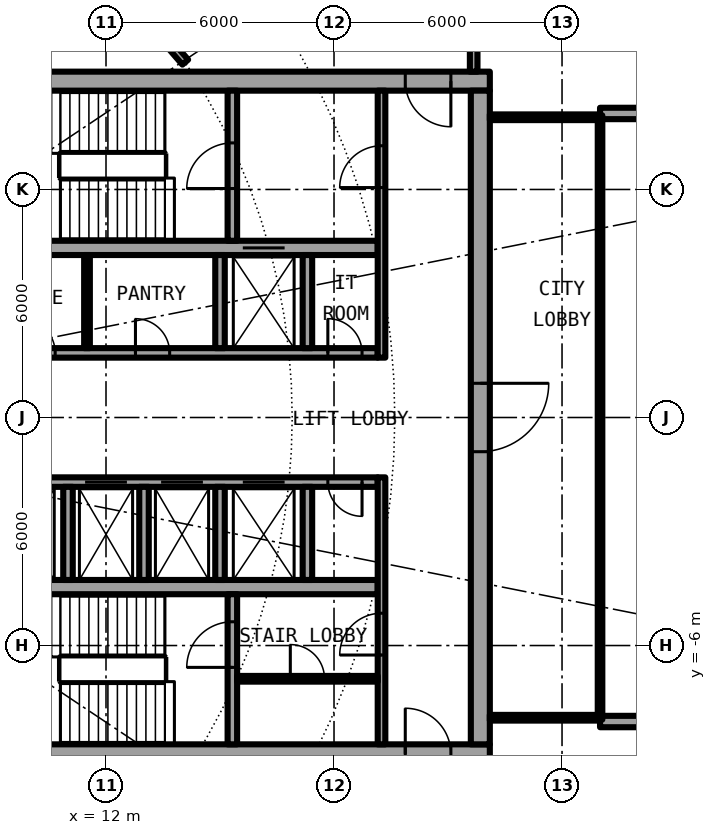
"""IFC4 building model, lengths in metres.
Left out: names, types, materials, properties, quantities, classifications, styles, units other than length and angle.
Written with IfcOpenShell. Run it as: python <this file> out.ifc"""

import sys

from ifc_helpers import new_model, si_unit, direction, frame, frame_2d, origin, place, context, subcontext, project, spatial, rectangle, extrude, element, fill, save


model = new_model("IFC4")
c1 = context("Model", 3, precision=1e-05, world=origin(), true_north=direction((0.0, 1.0)))
c2 = subcontext(c1, "Body", "Model", "MODEL_VIEW")
j1 = project(units=[si_unit("LENGTHUNIT", "METRE"), si_unit("PLANEANGLEUNIT", "RADIAN")], contexts=[c1])
p1 = place(None, origin())
s1 = spatial("IfcSite", under=j1, at=p1, CompositionType="ELEMENT")
p2 = place(p1, origin())
s2 = spatial("IfcBuilding", under=s1, at=p2, CompositionType="ELEMENT")
p3 = place(p2, frame((0.0, 0.0, 157.4)))
s3 = spatial("IfcBuildingStorey", under=s2, at=p3, CompositionType="ELEMENT", Elevation=157.4)
for number, where, z_axis, x_axis in (
    (1, (25.0, 8.0, 0.0), (0.0, 0.0, 1.0), (1.0, 0.0, 0.0)),
    (2, (25.0, -8.0, 0.0), (0.0, 0.0, 1.0), (1.0, 0.0, 0.0)),
):
    element("IfcWall", number, at=place(p3, frame(where, z_axis=z_axis, x_axis=x_axis)), inside=s3, PredefinedType="SOLIDWALL", context=c2, shape_type="SweptSolid", body=[
        extrude(rectangle(XDim=2.667, YDim=0.3, at=frame_2d((1.333, 0.0))), origin(), (0.0, 0.0, 1.0), 3.85),
    ])
p4 = place(p3, frame((22.1, 8.85, 0.0), z_axis=(0.0, 0.0, 1.0), x_axis=(-1.0, 0.0, 0.0)))
e3 = element("IfcWall", 3, at=p4, inside=s3, PredefinedType="SHEAR", context=c2, shape_type="SweptSolid", body=[
    extrude(rectangle(XDim=13.6, YDim=0.5, at=frame_2d((6.8, 0.0))), origin(), (0.0, 0.0, 1.0), 4.2),
])
p5 = place(p4, frame((1.025, 0.0, 0.0)))
e4 = element("IfcOpeningElement", 4, at=p5, cuts=e3, PredefinedType="OPENING", context=c2, shape_type="SweptSolid", body=[
    extrude(rectangle(XDim=1.2, YDim=2.3, at=frame_2d((0.6, 1.15))), frame((0.0, 0.26, 0.0), z_axis=(0.0, -1.0, 0.0), x_axis=(1.0, 0.0, 0.0)), (0.0, 0.0, 1.0), 0.52),
])
p6 = place(p3, frame((8.5, -8.85, 0.0), z_axis=(0.0, 0.0, 1.0), x_axis=(1.0, 0.0, 0.0)))
e5 = element("IfcWall", 5, at=p6, inside=s3, PredefinedType="SHEAR", context=c2, shape_type="SweptSolid", body=[
    extrude(rectangle(XDim=13.6, YDim=0.5, at=frame_2d((6.8, 0.0))), origin(), (0.0, 0.0, 1.0), 4.2),
])
p7 = place(p6, frame((11.375, 0.0, 0.0)))
e6 = element("IfcOpeningElement", 6, at=p7, cuts=e5, PredefinedType="OPENING", context=c2, shape_type="SweptSolid", body=[
    extrude(rectangle(XDim=1.2, YDim=2.3, at=frame_2d((0.6, 1.15))), frame((0.0, 0.26, 0.0), z_axis=(0.0, -1.0, 0.0), x_axis=(1.0, 0.0, 0.0)), (0.0, 0.0, 1.0), 0.52),
])
p8 = place(p3, frame((21.85, 8.6, 0.0), z_axis=(0.0, 0.0, 1.0), x_axis=(0.0, -1.0, 0.0)))
e7 = element("IfcWall", 7, at=p8, inside=s3, PredefinedType="SHEAR", context=c2, shape_type="SweptSolid", body=[
    extrude(rectangle(XDim=17.2, YDim=0.5, at=frame_2d((8.6, 0.0))), origin(), (0.0, 0.0, 1.0), 4.2),
])
p9 = place(p8, frame((7.7, 0.0, 0.0)))
e8 = element("IfcOpeningElement", 8, at=p9, cuts=e7, PredefinedType="OPENING", context=c2, shape_type="SweptSolid", body=[
    extrude(rectangle(XDim=1.8, YDim=2.3, at=frame_2d((0.9, 1.15))), frame((0.0, 0.26, 0.0), z_axis=(0.0, -1.0, 0.0), x_axis=(1.0, 0.0, 0.0)), (0.0, 0.0, 1.0), 0.52),
])
p10 = place(p3, frame((9.0, 1.7, 0.0), z_axis=(0.0, 0.0, 1.0), x_axis=(1.0, 0.0, 0.0)))
e9 = element("IfcWall", 9, at=p10, inside=s3, PredefinedType="SHEAR", context=c2, shape_type="SweptSolid", body=[
    extrude(rectangle(XDim=10.15, YDim=0.25, at=frame_2d((5.075, 0.0))), origin(), (0.0, 0.0, 1.0), 4.2),
])
p11 = place(p10, frame((0.762, 0.0, 0.0)))
e10 = element("IfcOpeningElement", 10, at=p11, cuts=e9, PredefinedType="OPENING", context=c2, shape_type="SweptSolid", body=[
    extrude(rectangle(XDim=0.9, YDim=2.3, at=frame_2d((0.45, 1.15))), frame((0.0, 0.135, 0.0), z_axis=(0.0, -1.0, 0.0), x_axis=(1.0, 0.0, 0.0)), (0.0, 0.0, 1.0), 0.27),
])
p12 = place(p10, frame((3.775, 0.0, 0.0)))
e11 = element("IfcOpeningElement", 11, at=p12, cuts=e9, PredefinedType="OPENING", context=c2, shape_type="SweptSolid", body=[
    extrude(rectangle(XDim=0.9, YDim=2.3, at=frame_2d((0.45, 1.15))), frame((0.0, 0.135, 0.0), z_axis=(0.0, -1.0, 0.0), x_axis=(1.0, 0.0, 0.0)), (0.0, 0.0, 1.0), 0.27),
])
p13 = place(p10, frame((8.837, 0.0, 0.0)))
e12 = element("IfcOpeningElement", 12, at=p13, cuts=e9, PredefinedType="OPENING", context=c2, shape_type="SweptSolid", body=[
    extrude(rectangle(XDim=0.9, YDim=2.3, at=frame_2d((0.45, 1.15))), frame((0.0, 0.135, 0.0), z_axis=(0.0, -1.0, 0.0), x_axis=(1.0, 0.0, 0.0)), (0.0, 0.0, 1.0), 0.27),
])
p14 = place(p3, frame((9.0, 4.462, 0.0), z_axis=(0.0, 0.0, 1.0), x_axis=(1.0, 0.0, 0.0)))
e13 = element("IfcWall", 13, at=p14, inside=s3, PredefinedType="SHEAR", context=c2, shape_type="SweptSolid", body=[
    extrude(rectangle(XDim=10.15, YDim=0.375, at=frame_2d((5.075, 0.0))), origin(), (0.0, 0.0, 1.0), 4.2),
])
p15 = place(p14, frame((6.6, 0.0, 0.0)))
e14 = element("IfcOpeningElement", 14, at=p15, cuts=e13, PredefinedType="OPENING", context=c2, shape_type="SweptSolid", body=[
    extrude(rectangle(XDim=1.1, YDim=2.3, at=frame_2d((0.55, 1.15))), frame((0.0, 0.198, 0.0), z_axis=(0.0, -1.0, 0.0), x_axis=(1.0, 0.0, 0.0)), (0.0, 0.0, 1.0), 0.395),
])
p16 = place(p3, frame((15.325, 4.65, 0.0), z_axis=(0.0, 0.0, 1.0), x_axis=(0.0, 1.0, 0.0)))
e15 = element("IfcWall", 15, at=p16, inside=s3, PredefinedType="SHEAR", context=c2, shape_type="SweptSolid", body=[
    extrude(rectangle(XDim=3.95, YDim=0.25, at=frame_2d((1.975, 0.0))), origin(), (0.0, 0.0, 1.0), 4.2),
])
p17 = place(p16, frame((1.375, 0.0, 0.0)))
e16 = element("IfcOpeningElement", 16, at=p17, cuts=e15, PredefinedType="OPENING", context=c2, shape_type="SweptSolid", body=[
    extrude(rectangle(XDim=1.2, YDim=2.3, at=frame_2d((0.6, 1.15))), frame((0.0, 0.135, 0.0), z_axis=(0.0, -1.0, 0.0), x_axis=(1.0, 0.0, 0.0)), (0.0, 0.0, 1.0), 0.27),
])
for number, where, z_axis, x_axis in (
    (17, (15.0, 1.825, 0.0), (0.0, 0.0, 1.0), (0.0, 1.0, 0.0)),
    (18, (17.3, 1.825, 0.0), (0.0, 0.0, 1.0), (0.0, 1.0, 0.0)),
):
    element("IfcWall", number, at=place(p3, frame(where, z_axis=z_axis, x_axis=x_axis)), inside=s3, PredefinedType="SOLIDWALL", context=c2, shape_type="SweptSolid", body=[
        extrude(rectangle(XDim=2.45, YDim=0.25, at=frame_2d((1.225, 0.0))), origin(), (0.0, 0.0, 1.0), 3.85),
    ])
p18 = place(p3, frame((19.25, 1.575, 0.0), z_axis=(0.0, 0.0, 1.0), x_axis=(0.0, 1.0, 0.0)))
e19 = element("IfcWall", 19, at=p18, inside=s3, PredefinedType="SOLIDWALL", context=c2, shape_type="SweptSolid", body=[
    extrude(rectangle(XDim=7.025, YDim=0.2, at=frame_2d((3.513, 0.0))), origin(), (0.0, 0.0, 1.0), 3.85),
])
p19 = place(p18, frame((4.475, 0.0, 0.0)))
e20 = element("IfcOpeningElement", 20, at=p19, cuts=e19, PredefinedType="OPENING", context=c2, shape_type="SweptSolid", body=[
    extrude(rectangle(XDim=1.1, YDim=2.3, at=frame_2d((0.55, 1.15))), frame((0.0, 0.11, 0.0), z_axis=(0.0, -1.0, 0.0), x_axis=(1.0, 0.0, 0.0)), (0.0, 0.0, 1.0), 0.22),
])
p20 = place(p3, frame((19.15, -1.7, 0.0), z_axis=(0.0, 0.0, 1.0), x_axis=(-1.0, 0.0, 0.0)))
e21 = element("IfcWall", 21, at=p20, inside=s3, PredefinedType="SHEAR", context=c2, shape_type="SweptSolid", body=[
    extrude(rectangle(XDim=10.15, YDim=0.25, at=frame_2d((5.075, 0.0))), origin(), (0.0, 0.0, 1.0), 4.2),
])
p21 = place(p20, frame((8.663, 0.0, 0.0)))
e22 = element("IfcOpeningElement", 22, at=p21, cuts=e21, PredefinedType="OPENING", context=c2, shape_type="SweptSolid", body=[
    extrude(rectangle(XDim=1.1, YDim=2.3, at=frame_2d((0.55, 1.15))), frame((0.0, 0.135, 0.0), z_axis=(0.0, -1.0, 0.0), x_axis=(1.0, 0.0, 0.0)), (0.0, 0.0, 1.0), 0.27),
])
p22 = place(p20, frame((6.6, 0.0, 0.0)))
e23 = element("IfcOpeningElement", 23, at=p22, cuts=e21, PredefinedType="OPENING", context=c2, shape_type="SweptSolid", body=[
    extrude(rectangle(XDim=1.1, YDim=2.3, at=frame_2d((0.55, 1.15))), frame((0.0, 0.135, 0.0), z_axis=(0.0, -1.0, 0.0), x_axis=(1.0, 0.0, 0.0)), (0.0, 0.0, 1.0), 0.27),
])
p23 = place(p20, frame((4.6, 0.0, 0.0)))
e24 = element("IfcOpeningElement", 24, at=p23, cuts=e21, PredefinedType="OPENING", context=c2, shape_type="SweptSolid", body=[
    extrude(rectangle(XDim=1.1, YDim=2.3, at=frame_2d((0.55, 1.15))), frame((0.0, 0.135, 0.0), z_axis=(0.0, -1.0, 0.0), x_axis=(1.0, 0.0, 0.0)), (0.0, 0.0, 1.0), 0.27),
])
p24 = place(p20, frame((2.45, 0.0, 0.0)))
e25 = element("IfcOpeningElement", 25, at=p24, cuts=e21, PredefinedType="OPENING", context=c2, shape_type="SweptSolid", body=[
    extrude(rectangle(XDim=1.1, YDim=2.3, at=frame_2d((0.55, 1.15))), frame((0.0, 0.135, 0.0), z_axis=(0.0, -1.0, 0.0), x_axis=(1.0, 0.0, 0.0)), (0.0, 0.0, 1.0), 0.27),
])
p25 = place(p20, frame((0.413, 0.0, 0.0)))
e26 = element("IfcOpeningElement", 26, at=p25, cuts=e21, PredefinedType="OPENING", context=c2, shape_type="SweptSolid", body=[
    extrude(rectangle(XDim=0.9, YDim=2.3, at=frame_2d((0.45, 1.15))), frame((0.0, 0.135, 0.0), z_axis=(0.0, -1.0, 0.0), x_axis=(1.0, 0.0, 0.0)), (0.0, 0.0, 1.0), 0.27),
])
p26 = place(p3, frame((9.0, -4.462, 0.0), z_axis=(0.0, 0.0, 1.0), x_axis=(1.0, 0.0, 0.0)))
e27 = element("IfcWall", 27, at=p26, inside=s3, PredefinedType="SHEAR", context=c2, shape_type="SweptSolid", body=[
    extrude(rectangle(XDim=10.15, YDim=0.375, at=frame_2d((5.075, 0.0))), origin(), (0.0, 0.0, 1.0), 4.2),
])
p27 = place(p3, frame((15.325, -8.6, 0.0), z_axis=(0.0, 0.0, 1.0), x_axis=(0.0, 1.0, 0.0)))
e28 = element("IfcWall", 28, at=p27, inside=s3, PredefinedType="SHEAR", context=c2, shape_type="SweptSolid", body=[
    extrude(rectangle(XDim=3.95, YDim=0.25, at=frame_2d((1.975, 0.0))), origin(), (0.0, 0.0, 1.0), 4.2),
])
p28 = place(p27, frame((2.025, 0.0, 0.0)))
e29 = element("IfcOpeningElement", 29, at=p28, cuts=e28, PredefinedType="OPENING", context=c2, shape_type="SweptSolid", body=[
    extrude(rectangle(XDim=1.2, YDim=2.3, at=frame_2d((0.6, 1.15))), frame((0.0, 0.135, 0.0), z_axis=(0.0, -1.0, 0.0), x_axis=(1.0, 0.0, 0.0)), (0.0, 0.0, 1.0), 0.27),
])
for number, where, z_axis, x_axis in (
    (30, (15.0, -1.825, 0.0), (0.0, 0.0, 1.0), (0.0, -1.0, 0.0)),
    (31, (17.3, -1.825, 0.0), (0.0, 0.0, 1.0), (0.0, -1.0, 0.0)),
):
    element("IfcWall", number, at=place(p3, frame(where, z_axis=z_axis, x_axis=x_axis)), inside=s3, PredefinedType="SOLIDWALL", context=c2, shape_type="SweptSolid", body=[
        extrude(rectangle(XDim=2.45, YDim=0.25, at=frame_2d((1.225, 0.0))), origin(), (0.0, 0.0, 1.0), 3.85),
    ])
p29 = place(p3, frame((19.25, -8.6, 0.0), z_axis=(0.0, 0.0, 1.0), x_axis=(0.0, 1.0, 0.0)))
e32 = element("IfcWall", 32, at=p29, inside=s3, PredefinedType="SOLIDWALL", context=c2, shape_type="SweptSolid", body=[
    extrude(rectangle(XDim=7.025, YDim=0.2, at=frame_2d((3.513, 0.0))), origin(), (0.0, 0.0, 1.0), 3.85),
])
p30 = place(p29, frame((2.35, 0.0, 0.0)))
e33 = element("IfcOpeningElement", 33, at=p30, cuts=e32, PredefinedType="OPENING", context=c2, shape_type="SweptSolid", body=[
    extrude(rectangle(XDim=1.1, YDim=2.3, at=frame_2d((0.55, 1.15))), frame((0.0, 0.11, 0.0), z_axis=(0.0, -1.0, 0.0), x_axis=(1.0, 0.0, 0.0)), (0.0, 0.0, 1.0), 0.22),
])
for number, where, z_axis, x_axis in (
    (34, (11.0, -1.825, 0.0), (0.0, 0.0, 1.0), (0.0, -1.0, 0.0)),
    (35, (13.0, -1.825, 0.0), (0.0, 0.0, 1.0), (0.0, -1.0, 0.0)),
):
    element("IfcWall", number, at=place(p3, frame(where, z_axis=z_axis, x_axis=x_axis)), inside=s3, PredefinedType="SOLIDWALL", context=c2, shape_type="SweptSolid", body=[
        extrude(rectangle(XDim=2.45, YDim=0.25, at=frame_2d((1.225, 0.0))), origin(), (0.0, 0.0, 1.0), 3.85),
    ])
p31 = place(p3, frame((11.5, 1.825, 0.0), z_axis=(0.0, 0.0, 1.0), x_axis=(0.0, 1.0, 0.0)))
e36 = element("IfcWall", 36, at=p31, inside=s3, PredefinedType="PARTITIONING", context=c2, shape_type="SweptSolid", body=[
    extrude(rectangle(XDim=2.45, YDim=0.15, at=frame_2d((1.225, 0.0))), origin(), (0.0, 0.0, 1.0), 3.85),
])
p32 = place(p3, frame((15.45, -6.875, 0.0), z_axis=(0.0, 0.0, 1.0), x_axis=(1.0, 0.0, 0.0)))
e37 = element("IfcWall", 37, at=p32, inside=s3, PredefinedType="PARTITIONING", context=c2, shape_type="SweptSolid", body=[
    extrude(rectangle(XDim=3.7, YDim=0.15, at=frame_2d((1.85, 0.0))), origin(), (0.0, 0.0, 1.0), 3.85),
])
p33 = place(p32, frame((1.4, 0.0, 0.0)))
e38 = element("IfcOpeningElement", 38, at=p33, cuts=e37, PredefinedType="OPENING", context=c2, shape_type="SweptSolid", body=[
    extrude(rectangle(XDim=0.9, YDim=2.3, at=frame_2d((0.45, 1.15))), frame((0.0, 0.085, 0.0), z_axis=(0.0, -1.0, 0.0), x_axis=(1.0, 0.0, 0.0)), (0.0, 0.0, 1.0), 0.17),
])
for number, where, z_axis, x_axis in (
    (39, (22.1, -7.9, 0.0), (0.0, 0.0, 1.0), (1.0, 0.0, 0.0)),
    (40, (22.1, 7.9, 0.0), (0.0, 0.0, 1.0), (1.0, 0.0, 0.0)),
):
    element("IfcWall", number, at=place(p3, frame(where, z_axis=z_axis, x_axis=x_axis)), inside=s3, PredefinedType="PARTITIONING", context=c2, shape_type="SweptSolid", body=[
        extrude(rectangle(XDim=2.84, YDim=0.15, at=frame_2d((1.42, 0.0))), origin(), (0.0, 0.0, 1.0), 3.85),
    ])
p34 = place(p3, frame((25.0, -7.95, 0.0), z_axis=(0.0, 0.0, 1.0), x_axis=(0.0, 1.0, 0.0)))
e41 = element("IfcWall", 41, at=p34, inside=s3, PredefinedType="PARTITIONING", context=c2, shape_type="SweptSolid", body=[
    extrude(rectangle(XDim=15.9, YDim=0.12, at=frame_2d((7.95, 0.0))), origin(), (0.0, 0.0, 1.0), 3.85),
])
p35 = place(p34, frame((0.95, 0.0, 0.1)))
e42 = element("IfcOpeningElement", 42, at=p35, cuts=e41, PredefinedType="OPENING", context=c2, shape_type="SweptSolid", body=[
    extrude(rectangle(XDim=14.0, YDim=3.5, at=frame_2d((7.0, 1.75))), frame((0.0, 0.07, 0.0), z_axis=(0.0, -1.0, 0.0), x_axis=(1.0, 0.0, 0.0)), (0.0, 0.0, 1.0), 0.14),
])
p36 = place(p3, frame((21.675, 9.1, 0.0), z_axis=(0.0, 0.0, 1.0), x_axis=(0.0, 1.0, 0.0)))
e43 = element("IfcWall", 43, at=p36, inside=s3, PredefinedType="PARTITIONING", context=c2, shape_type="SweptSolid", body=[
    extrude(rectangle(XDim=1.75, YDim=0.2, at=frame_2d((0.875, 0.0))), origin(), (0.0, 0.0, 1.0), 3.85),
])
p37 = place(p3, frame((11.349, 12.522, 0.0), z_axis=(0.0, 0.0, 1.0), x_axis=(0.653273870261, -0.757121687996, 0.0)))
e44 = element("IfcWall", 44, at=p37, inside=s3, PredefinedType="PARTITIONING", context=c2, shape_type="SweptSolid", body=[
    extrude(rectangle(XDim=4.189, YDim=0.2, at=frame_2d((2.095, 0.0))), origin(), (0.0, 0.0, 1.0), 3.85),
])
p38 = place(p37, frame((1.569, 0.0, 0.0)))
e45 = element("IfcOpeningElement", 45, at=p38, cuts=e44, PredefinedType="OPENING", context=c2, shape_type="SweptSolid", body=[
    extrude(rectangle(XDim=1.0, YDim=2.3, at=frame_2d((0.5, 1.15))), frame((0.0, 0.11, 0.0), z_axis=(0.0, -1.0, 0.0), x_axis=(1.0, 0.0, 0.0)), (0.0, 0.0, 1.0), 0.22),
])
p39 = place(p15, origin())
e46 = element("IfcDoor", 46, at=p39, inside=s3, OperationType="DOUBLE_DOOR_SLIDING", PredefinedType="DOOR", context=c2, shape_type="SweptSolid", body=[
    extrude(rectangle(XDim=1.1, YDim=2.3, at=frame_2d((0.55, 1.15))), frame((0.0, 0.025, 0.0), z_axis=(0.0, -1.0, 0.0), x_axis=(1.0, 0.0, 0.0)), (0.0, 0.0, 1.0), 0.05),
])
fill(e14, e46)
p40 = place(p22, origin())
e47 = element("IfcDoor", 47, at=p40, inside=s3, OperationType="DOUBLE_DOOR_SLIDING", PredefinedType="DOOR", context=c2, shape_type="SweptSolid", body=[
    extrude(rectangle(XDim=1.1, YDim=2.3, at=frame_2d((0.55, 1.15))), frame((0.0, 0.025, 0.0), z_axis=(0.0, -1.0, 0.0), x_axis=(1.0, 0.0, 0.0)), (0.0, 0.0, 1.0), 0.05),
])
fill(e23, e47)
p41 = place(p23, origin())
e48 = element("IfcDoor", 48, at=p41, inside=s3, OperationType="DOUBLE_DOOR_SLIDING", PredefinedType="DOOR", context=c2, shape_type="SweptSolid", body=[
    extrude(rectangle(XDim=1.1, YDim=2.3, at=frame_2d((0.55, 1.15))), frame((0.0, 0.025, 0.0), z_axis=(0.0, -1.0, 0.0), x_axis=(1.0, 0.0, 0.0)), (0.0, 0.0, 1.0), 0.05),
])
fill(e24, e48)
p42 = place(p24, origin())
e49 = element("IfcDoor", 49, at=p42, inside=s3, OperationType="DOUBLE_DOOR_SLIDING", PredefinedType="DOOR", context=c2, shape_type="SweptSolid", body=[
    extrude(rectangle(XDim=1.1, YDim=2.3, at=frame_2d((0.55, 1.15))), frame((0.0, 0.025, 0.0), z_axis=(0.0, -1.0, 0.0), x_axis=(1.0, 0.0, 0.0)), (0.0, 0.0, 1.0), 0.05),
])
fill(e25, e49)
p43 = place(p11, origin())
e50 = element("IfcDoor", 50, at=p43, inside=s3, OperationType="SINGLE_SWING_RIGHT", PredefinedType="DOOR", context=c2, shape_type="SweptSolid", body=[
    extrude(rectangle(XDim=0.9, YDim=2.3, at=frame_2d((0.45, 1.15))), frame((0.0, 0.025, 0.0), z_axis=(0.0, -1.0, 0.0), x_axis=(1.0, 0.0, 0.0)), (0.0, 0.0, 1.0), 0.05),
])
fill(e10, e50)
p44 = place(p12, origin())
e51 = element("IfcDoor", 51, at=p44, inside=s3, OperationType="SINGLE_SWING_RIGHT", PredefinedType="DOOR", context=c2, shape_type="SweptSolid", body=[
    extrude(rectangle(XDim=0.9, YDim=2.3, at=frame_2d((0.45, 1.15))), frame((0.0, 0.025, 0.0), z_axis=(0.0, -1.0, 0.0), x_axis=(1.0, 0.0, 0.0)), (0.0, 0.0, 1.0), 0.05),
])
fill(e11, e51)
p45 = place(p13, origin())
e52 = element("IfcDoor", 52, at=p45, inside=s3, OperationType="SINGLE_SWING_LEFT", PredefinedType="DOOR", context=c2, shape_type="SweptSolid", body=[
    extrude(rectangle(XDim=0.9, YDim=2.3, at=frame_2d((0.45, 1.15))), frame((0.0, 0.025, 0.0), z_axis=(0.0, -1.0, 0.0), x_axis=(1.0, 0.0, 0.0)), (0.0, 0.0, 1.0), 0.05),
])
fill(e12, e52)
p46 = place(p25, origin())
e53 = element("IfcDoor", 53, at=p46, inside=s3, OperationType="SINGLE_SWING_RIGHT", PredefinedType="DOOR", context=c2, shape_type="SweptSolid", body=[
    extrude(rectangle(XDim=0.9, YDim=2.3, at=frame_2d((0.45, 1.15))), frame((0.0, 0.025, 0.0), z_axis=(0.0, -1.0, 0.0), x_axis=(1.0, 0.0, 0.0)), (0.0, 0.0, 1.0), 0.05),
])
fill(e26, e53)
p47 = place(p33, origin())
e54 = element("IfcDoor", 54, at=p47, inside=s3, OperationType="SINGLE_SWING_LEFT", PredefinedType="DOOR", context=c2, shape_type="SweptSolid", body=[
    extrude(rectangle(XDim=0.9, YDim=2.3, at=frame_2d((0.45, 1.15))), frame((0.0, 0.025, 0.0), z_axis=(0.0, -1.0, 0.0), x_axis=(1.0, 0.0, 0.0)), (0.0, 0.0, 1.0), 0.05),
])
fill(e38, e54)
p48 = place(p17, origin())
e55 = element("IfcDoor", 55, at=p48, inside=s3, OperationType="SINGLE_SWING_LEFT", PredefinedType="DOOR", context=c2, shape_type="SweptSolid", body=[
    extrude(rectangle(XDim=1.2, YDim=2.3, at=frame_2d((0.6, 1.15))), frame((0.0, 0.025, 0.0), z_axis=(0.0, -1.0, 0.0), x_axis=(1.0, 0.0, 0.0)), (0.0, 0.0, 1.0), 0.05),
])
fill(e16, e55)
p49 = place(p28, origin())
e56 = element("IfcDoor", 56, at=p49, inside=s3, OperationType="SINGLE_SWING_LEFT", PredefinedType="DOOR", context=c2, shape_type="SweptSolid", body=[
    extrude(rectangle(XDim=1.2, YDim=2.3, at=frame_2d((0.6, 1.15))), frame((0.0, 0.025, 0.0), z_axis=(0.0, -1.0, 0.0), x_axis=(1.0, 0.0, 0.0)), (0.0, 0.0, 1.0), 0.05),
])
fill(e29, e56)
p50 = place(p19, origin())
e57 = element("IfcDoor", 57, at=p50, inside=s3, OperationType="SINGLE_SWING_LEFT", PredefinedType="DOOR", context=c2, shape_type="SweptSolid", body=[
    extrude(rectangle(XDim=1.1, YDim=2.3, at=frame_2d((0.55, 1.15))), frame((0.0, 0.025, 0.0), z_axis=(0.0, -1.0, 0.0), x_axis=(1.0, 0.0, 0.0)), (0.0, 0.0, 1.0), 0.05),
])
fill(e20, e57)
p51 = place(p30, origin())
e58 = element("IfcDoor", 58, at=p51, inside=s3, OperationType="SINGLE_SWING_RIGHT", PredefinedType="DOOR", context=c2, shape_type="SweptSolid", body=[
    extrude(rectangle(XDim=1.1, YDim=2.3, at=frame_2d((0.55, 1.15))), frame((0.0, 0.025, 0.0), z_axis=(0.0, -1.0, 0.0), x_axis=(1.0, 0.0, 0.0)), (0.0, 0.0, 1.0), 0.05),
])
fill(e33, e58)
p52 = place(p5, origin())
e59 = element("IfcDoor", 59, at=p52, inside=s3, OperationType="SINGLE_SWING_RIGHT", PredefinedType="DOOR", context=c2, shape_type="SweptSolid", body=[
    extrude(rectangle(XDim=1.2, YDim=2.3, at=frame_2d((0.6, 1.15))), frame((0.0, 0.025, 0.0), z_axis=(0.0, -1.0, 0.0), x_axis=(1.0, 0.0, 0.0)), (0.0, 0.0, 1.0), 0.05),
])
fill(e4, e59)
p53 = place(p7, origin())
e60 = element("IfcDoor", 60, at=p53, inside=s3, OperationType="SINGLE_SWING_LEFT", PredefinedType="DOOR", context=c2, shape_type="SweptSolid", body=[
    extrude(rectangle(XDim=1.2, YDim=2.3, at=frame_2d((0.6, 1.15))), frame((0.0, 0.025, 0.0), z_axis=(0.0, -1.0, 0.0), x_axis=(1.0, 0.0, 0.0)), (0.0, 0.0, 1.0), 0.05),
])
fill(e6, e60)
p54 = place(p9, origin())
e61 = element("IfcDoor", 61, at=p54, inside=s3, OperationType="SINGLE_SWING_LEFT", PredefinedType="DOOR", context=c2, shape_type="SweptSolid", body=[
    extrude(rectangle(XDim=1.8, YDim=2.3, at=frame_2d((0.9, 1.15))), frame((0.0, 0.025, 0.0), z_axis=(0.0, -1.0, 0.0), x_axis=(1.0, 0.0, 0.0)), (0.0, 0.0, 1.0), 0.05),
])
fill(e8, e61)
p55 = place(p35, origin())
e62 = element("IfcWindow", 62, at=p55, inside=s3, PartitioningType="SINGLE_PANEL", PredefinedType="WINDOW", context=c2, shape_type="SweptSolid", body=[
    extrude(rectangle(XDim=14.0, YDim=3.5, at=frame_2d((7.0, 1.75))), frame((0.0, 0.03, 0.0), z_axis=(0.0, -1.0, 0.0), x_axis=(1.0, 0.0, 0.0)), (0.0, 0.0, 1.0), 0.06),
])
fill(e42, e62)
save(model, sys.argv[1])
